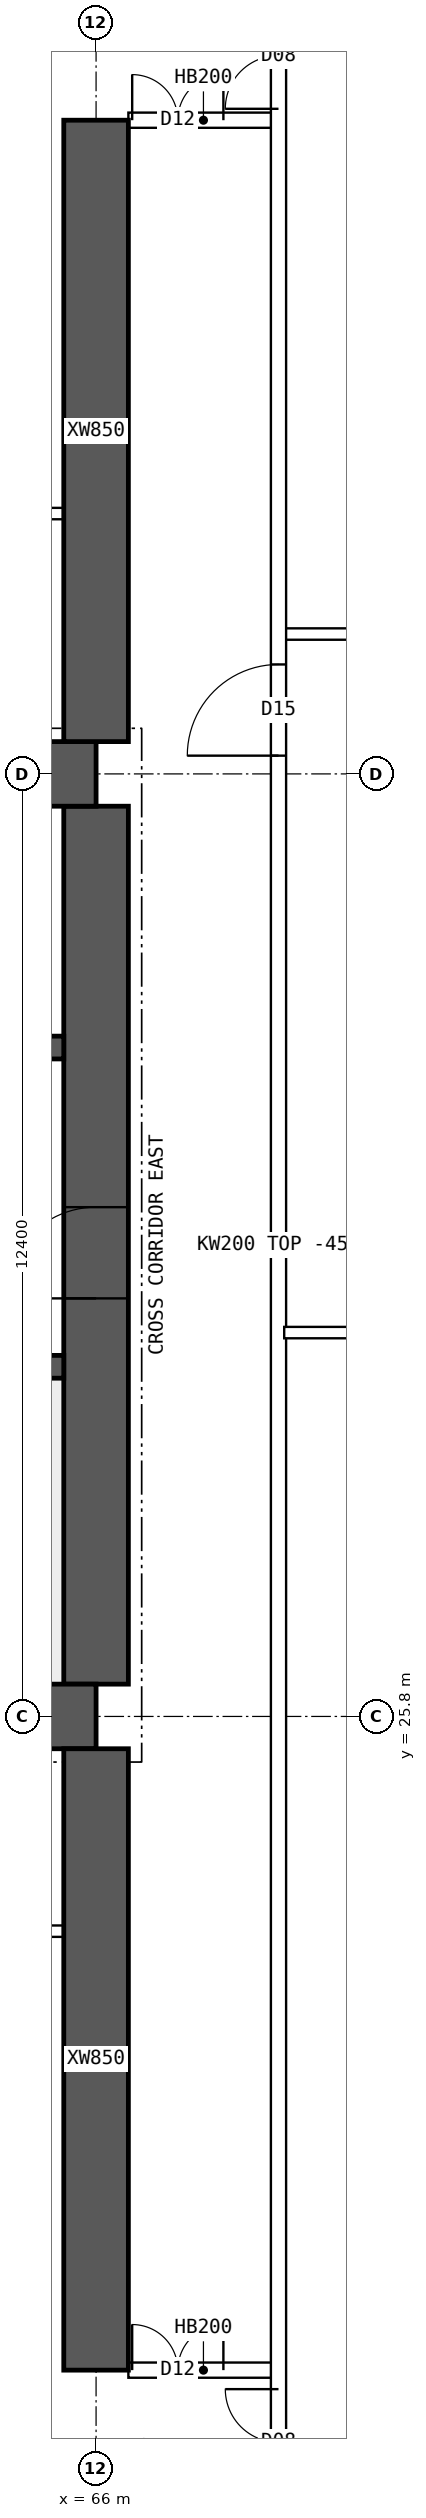
"""IFC4 building model, lengths in metres.
Left out: names, types, materials, properties, quantities, classifications, styles, units other than length and angle.
Written with IfcOpenShell. Run it as: python <this file> out.ifc"""

import sys

from ifc_helpers import new_model, si_unit, direction, frame, frame_2d, origin, place, context, subcontext, project, spatial, polyline, rectangle, outline, extrude, element, fill, save


model = new_model("IFC4")
c1 = context("Model", 3, precision=1e-05, world=origin(), true_north=direction((0.0, 1.0)))
c2 = subcontext(c1, "Body", "Model", "MODEL_VIEW")
j1 = project(units=[si_unit("LENGTHUNIT", "METRE"), si_unit("PLANEANGLEUNIT", "RADIAN")], contexts=[c1])
p1 = place(None, origin())
s1 = spatial("IfcSite", under=j1, at=p1, CompositionType="ELEMENT")
p2 = place(p1, origin())
s2 = spatial("IfcBuilding", under=s1, at=p2, CompositionType="ELEMENT")
p3 = place(p2, frame((0.0, 0.0, 189.85)))
s3 = spatial("IfcBuildingStorey", under=s2, at=p3, CompositionType="ELEMENT", Elevation=189.85)
for number, where, z_axis, x_axis in (
    (1, (18.0, 25.8, 0.0), (0.0, 0.0, 1.0), (1.0, 0.0, 0.0)),
    (2, (18.0, 38.2, 0.0), (0.0, 0.0, 1.0), (1.0, 0.0, 0.0)),
):
    element("IfcWall", number, at=place(p3, frame(where, z_axis=z_axis, x_axis=x_axis)), inside=s3, PredefinedType="SHEAR", context=c2, shape_type="SweptSolid", body=[
        extrude(rectangle(XDim=48.0, YDim=0.85, at=frame_2d((24.0, 0.0))), origin(), (0.0, 0.0, 1.0), 3.75),
    ])
p4 = place(p3, frame((66.0, 26.225, 0.0), z_axis=(0.0, 0.0, 1.0), x_axis=(0.0, 1.0, 0.0)))
e3 = element("IfcWall", 3, at=p4, inside=s3, PredefinedType="SHEAR", context=c2, shape_type="SweptSolid", body=[
    extrude(rectangle(XDim=11.55, YDim=0.85, at=frame_2d((5.775, 0.0))), origin(), (0.0, 0.0, 1.0), 3.75),
])
p5 = place(p4, frame((5.075, 0.0, 0.0)))
e4 = element("IfcOpeningElement", 4, at=p5, cuts=e3, PredefinedType="OPENING", context=c2, shape_type="SweptSolid", body=[
    extrude(rectangle(XDim=1.2, YDim=2.1, at=frame_2d((0.6, 1.05))), frame((0.0, 0.435, 0.0), z_axis=(0.0, -1.0, 0.0), x_axis=(1.0, 0.0, 0.0)), (0.0, 0.0, 1.0), 0.87),
])
p6 = place(p3, frame((18.425, 30.4, 0.0), z_axis=(0.0, 0.0, 1.0), x_axis=(1.0, 0.0, 0.0)))
e5 = element("IfcWall", 5, at=p6, inside=s3, PredefinedType="SHEAR", context=c2, shape_type="SweptSolid", body=[
    extrude(rectangle(XDim=47.15, YDim=0.3, at=frame_2d((23.575, 0.0))), origin(), (0.0, 0.0, 1.0), 3.75),
])
p7 = place(p6, frame((0.4, 0.0, 0.0)))
e6 = element("IfcOpeningElement", 6, at=p7, cuts=e5, PredefinedType="OPENING", context=c2, shape_type="SweptSolid", body=[
    extrude(rectangle(XDim=1.0, YDim=2.1, at=frame_2d((0.5, 1.05))), frame((0.0, 0.16, 0.0), z_axis=(0.0, -1.0, 0.0), x_axis=(1.0, 0.0, 0.0)), (0.0, 0.0, 1.0), 0.32),
])
p8 = place(p6, frame((45.75, 0.0, 0.0)))
e7 = element("IfcOpeningElement", 7, at=p8, cuts=e5, PredefinedType="OPENING", context=c2, shape_type="SweptSolid", body=[
    extrude(rectangle(XDim=1.0, YDim=2.1, at=frame_2d((0.5, 1.05))), frame((0.0, 0.16, 0.0), z_axis=(0.0, -1.0, 0.0), x_axis=(1.0, 0.0, 0.0)), (0.0, 0.0, 1.0), 0.32),
])
p9 = place(p6, frame((8.325, 0.0, 0.0)))
e8 = element("IfcOpeningElement", 8, at=p9, cuts=e5, PredefinedType="OPENING", context=c2, shape_type="SweptSolid", body=[
    extrude(rectangle(XDim=1.1, YDim=2.1, at=frame_2d((0.55, 1.05))), frame((0.0, 0.16, 0.0), z_axis=(0.0, -1.0, 0.0), x_axis=(1.0, 0.0, 0.0)), (0.0, 0.0, 1.0), 0.32),
])
p10 = place(p6, frame((10.925, 0.0, 0.0)))
e9 = element("IfcOpeningElement", 9, at=p10, cuts=e5, PredefinedType="OPENING", context=c2, shape_type="SweptSolid", body=[
    extrude(rectangle(XDim=1.1, YDim=2.1, at=frame_2d((0.55, 1.05))), frame((0.0, 0.16, 0.0), z_axis=(0.0, -1.0, 0.0), x_axis=(1.0, 0.0, 0.0)), (0.0, 0.0, 1.0), 0.32),
])
p11 = place(p6, frame((13.525, 0.0, 0.0)))
e10 = element("IfcOpeningElement", 10, at=p11, cuts=e5, PredefinedType="OPENING", context=c2, shape_type="SweptSolid", body=[
    extrude(rectangle(XDim=1.1, YDim=2.1, at=frame_2d((0.55, 1.05))), frame((0.0, 0.16, 0.0), z_axis=(0.0, -1.0, 0.0), x_axis=(1.0, 0.0, 0.0)), (0.0, 0.0, 1.0), 0.32),
])
p12 = place(p6, frame((16.125, 0.0, 0.0)))
e11 = element("IfcOpeningElement", 11, at=p12, cuts=e5, PredefinedType="OPENING", context=c2, shape_type="SweptSolid", body=[
    extrude(rectangle(XDim=1.1, YDim=2.1, at=frame_2d((0.55, 1.05))), frame((0.0, 0.16, 0.0), z_axis=(0.0, -1.0, 0.0), x_axis=(1.0, 0.0, 0.0)), (0.0, 0.0, 1.0), 0.32),
])
p13 = place(p6, frame((18.9, 0.0, 0.0)))
e12 = element("IfcOpeningElement", 12, at=p13, cuts=e5, PredefinedType="OPENING", context=c2, shape_type="SweptSolid", body=[
    extrude(rectangle(XDim=0.9, YDim=2.1, at=frame_2d((0.45, 1.05))), frame((0.0, 0.16, 0.0), z_axis=(0.0, -1.0, 0.0), x_axis=(1.0, 0.0, 0.0)), (0.0, 0.0, 1.0), 0.32),
])
p14 = place(p6, frame((30.192, 0.0, 0.0)))
e13 = element("IfcOpeningElement", 13, at=p14, cuts=e5, PredefinedType="OPENING", context=c2, shape_type="SweptSolid", body=[
    extrude(rectangle(XDim=1.1, YDim=2.1, at=frame_2d((0.55, 1.05))), frame((0.0, 0.16, 0.0), z_axis=(0.0, -1.0, 0.0), x_axis=(1.0, 0.0, 0.0)), (0.0, 0.0, 1.0), 0.32),
])
p15 = place(p6, frame((33.725, 0.0, 0.0)))
e14 = element("IfcOpeningElement", 14, at=p15, cuts=e5, PredefinedType="OPENING", context=c2, shape_type="SweptSolid", body=[
    extrude(rectangle(XDim=1.1, YDim=2.1, at=frame_2d((0.55, 1.05))), frame((0.0, 0.16, 0.0), z_axis=(0.0, -1.0, 0.0), x_axis=(1.0, 0.0, 0.0)), (0.0, 0.0, 1.0), 0.32),
])
p16 = place(p6, frame((37.258, 0.0, 0.0)))
e15 = element("IfcOpeningElement", 15, at=p16, cuts=e5, PredefinedType="OPENING", context=c2, shape_type="SweptSolid", body=[
    extrude(rectangle(XDim=1.1, YDim=2.1, at=frame_2d((0.55, 1.05))), frame((0.0, 0.16, 0.0), z_axis=(0.0, -1.0, 0.0), x_axis=(1.0, 0.0, 0.0)), (0.0, 0.0, 1.0), 0.32),
])
p17 = place(p3, frame((18.425, 34.6, 0.0), z_axis=(0.0, 0.0, 1.0), x_axis=(1.0, 0.0, 0.0)))
e16 = element("IfcWall", 16, at=p17, inside=s3, PredefinedType="SHEAR", context=c2, shape_type="SweptSolid", body=[
    extrude(rectangle(XDim=47.15, YDim=0.3, at=frame_2d((23.575, 0.0))), origin(), (0.0, 0.0, 1.0), 3.75),
])
p18 = place(p17, frame((0.9, 0.0, 0.0)))
e17 = element("IfcOpeningElement", 17, at=p18, cuts=e16, PredefinedType="OPENING", context=c2, shape_type="SweptSolid", body=[
    extrude(rectangle(XDim=1.1, YDim=2.1, at=frame_2d((0.55, 1.05))), frame((0.0, 0.16, 0.0), z_axis=(0.0, -1.0, 0.0), x_axis=(1.0, 0.0, 0.0)), (0.0, 0.0, 1.0), 0.32),
])
p19 = place(p17, frame((45.15, 0.0, 0.0)))
e18 = element("IfcOpeningElement", 18, at=p19, cuts=e16, PredefinedType="OPENING", context=c2, shape_type="SweptSolid", body=[
    extrude(rectangle(XDim=1.1, YDim=2.1, at=frame_2d((0.55, 1.05))), frame((0.0, 0.16, 0.0), z_axis=(0.0, -1.0, 0.0), x_axis=(1.0, 0.0, 0.0)), (0.0, 0.0, 1.0), 0.32),
])
p20 = place(p17, frame((4.175, 0.0, 0.0)))
e19 = element("IfcOpeningElement", 19, at=p20, cuts=e16, PredefinedType="OPENING", context=c2, shape_type="SweptSolid", body=[
    extrude(rectangle(XDim=0.9, YDim=2.1, at=frame_2d((0.45, 1.05))), frame((0.0, 0.16, 0.0), z_axis=(0.0, -1.0, 0.0), x_axis=(1.0, 0.0, 0.0)), (0.0, 0.0, 1.0), 0.32),
])
p21 = place(p17, frame((42.075, 0.0, 0.0)))
e20 = element("IfcOpeningElement", 20, at=p21, cuts=e16, PredefinedType="OPENING", context=c2, shape_type="SweptSolid", body=[
    extrude(rectangle(XDim=0.9, YDim=2.1, at=frame_2d((0.45, 1.05))), frame((0.0, 0.16, 0.0), z_axis=(0.0, -1.0, 0.0), x_axis=(1.0, 0.0, 0.0)), (0.0, 0.0, 1.0), 0.32),
])
p22 = place(p17, frame((8.95, 0.0, 0.0)))
e21 = element("IfcOpeningElement", 21, at=p22, cuts=e16, PredefinedType="OPENING", context=c2, shape_type="SweptSolid", body=[
    extrude(rectangle(XDim=0.9, YDim=2.1, at=frame_2d((0.45, 1.05))), frame((0.0, 0.16, 0.0), z_axis=(0.0, -1.0, 0.0), x_axis=(1.0, 0.0, 0.0)), (0.0, 0.0, 1.0), 0.32),
])
p23 = place(p17, frame((12.924, 0.0, 0.0)))
e22 = element("IfcOpeningElement", 22, at=p23, cuts=e16, PredefinedType="OPENING", context=c2, shape_type="SweptSolid", body=[
    extrude(rectangle(XDim=0.9, YDim=2.1, at=frame_2d((0.45, 1.05))), frame((0.0, 0.16, 0.0), z_axis=(0.0, -1.0, 0.0), x_axis=(1.0, 0.0, 0.0)), (0.0, 0.0, 1.0), 0.32),
])
p24 = place(p17, frame((16.571, 0.0, 0.0)))
e23 = element("IfcOpeningElement", 23, at=p24, cuts=e16, PredefinedType="OPENING", context=c2, shape_type="SweptSolid", body=[
    extrude(rectangle(XDim=0.9, YDim=2.1, at=frame_2d((0.45, 1.05))), frame((0.0, 0.16, 0.0), z_axis=(0.0, -1.0, 0.0), x_axis=(1.0, 0.0, 0.0)), (0.0, 0.0, 1.0), 0.32),
])
p25 = place(p17, frame((20.33, 0.0, 0.0)))
e24 = element("IfcOpeningElement", 24, at=p25, cuts=e16, PredefinedType="OPENING", context=c2, shape_type="SweptSolid", body=[
    extrude(rectangle(XDim=0.9, YDim=2.1, at=frame_2d((0.45, 1.05))), frame((0.0, 0.16, 0.0), z_axis=(0.0, -1.0, 0.0), x_axis=(1.0, 0.0, 0.0)), (0.0, 0.0, 1.0), 0.32),
])
p26 = place(p17, frame((24.736, 0.0, 0.0)))
e25 = element("IfcOpeningElement", 25, at=p26, cuts=e16, PredefinedType="OPENING", context=c2, shape_type="SweptSolid", body=[
    extrude(rectangle(XDim=0.9, YDim=2.1, at=frame_2d((0.45, 1.05))), frame((0.0, 0.16, 0.0), z_axis=(0.0, -1.0, 0.0), x_axis=(1.0, 0.0, 0.0)), (0.0, 0.0, 1.0), 0.32),
])
p27 = place(p17, frame((27.533, 0.0, 0.0)))
e26 = element("IfcOpeningElement", 26, at=p27, cuts=e16, PredefinedType="OPENING", context=c2, shape_type="SweptSolid", body=[
    extrude(rectangle(XDim=0.9, YDim=2.1, at=frame_2d((0.45, 1.05))), frame((0.0, 0.16, 0.0), z_axis=(0.0, -1.0, 0.0), x_axis=(1.0, 0.0, 0.0)), (0.0, 0.0, 1.0), 0.32),
])
p28 = place(p17, frame((30.716, 0.0, 0.0)))
e27 = element("IfcOpeningElement", 27, at=p28, cuts=e16, PredefinedType="OPENING", context=c2, shape_type="SweptSolid", body=[
    extrude(rectangle(XDim=0.9, YDim=2.1, at=frame_2d((0.45, 1.05))), frame((0.0, 0.16, 0.0), z_axis=(0.0, -1.0, 0.0), x_axis=(1.0, 0.0, 0.0)), (0.0, 0.0, 1.0), 0.32),
])
p29 = place(p17, frame((34.667, 0.0, 0.0)))
e28 = element("IfcOpeningElement", 28, at=p29, cuts=e16, PredefinedType="OPENING", context=c2, shape_type="SweptSolid", body=[
    extrude(rectangle(XDim=0.9, YDim=2.1, at=frame_2d((0.45, 1.05))), frame((0.0, 0.16, 0.0), z_axis=(0.0, -1.0, 0.0), x_axis=(1.0, 0.0, 0.0)), (0.0, 0.0, 1.0), 0.32),
])
p30 = place(p17, frame((37.605, 0.0, 0.0)))
e29 = element("IfcOpeningElement", 29, at=p30, cuts=e16, PredefinedType="OPENING", context=c2, shape_type="SweptSolid", body=[
    extrude(rectangle(XDim=0.9, YDim=2.1, at=frame_2d((0.45, 1.05))), frame((0.0, 0.16, 0.0), z_axis=(0.0, -1.0, 0.0), x_axis=(1.0, 0.0, 0.0)), (0.0, 0.0, 1.0), 0.32),
])
for number, where, z_axis, x_axis in (
    (30, (66.0, 17.2, 0.0), (0.0, 0.0, 1.0), (0.0, 1.0, 0.0)),
    (31, (66.0, 38.625, 0.0), (0.0, 0.0, 1.0), (0.0, 1.0, 0.0)),
):
    element("IfcWall", number, at=place(p3, frame(where, z_axis=z_axis, x_axis=x_axis)), inside=s3, PredefinedType="SHEAR", context=c2, shape_type="SweptSolid", body=[
        extrude(rectangle(XDim=8.175, YDim=0.85, at=frame_2d((4.087, 0.0))), origin(), (0.0, 0.0, 1.0), 3.75),
    ])
p31 = place(p3, frame((66.425, 17.2, 0.0), z_axis=(0.0, 0.0, 1.0), x_axis=(1.0, 0.0, 0.0)))
e32 = element("IfcWall", 32, at=p31, inside=s3, PredefinedType="SOLIDWALL", context=c2, shape_type="SweptSolid", body=[
    extrude(rectangle(XDim=1.975, YDim=0.2, at=frame_2d((0.987, 0.0))), origin(), (0.0, 0.0, 1.0), 3.3),
])
p32 = place(p31, frame((0.05, 0.0, 0.0)))
e33 = element("IfcOpeningElement", 33, at=p32, cuts=e32, PredefinedType="OPENING", context=c2, shape_type="SweptSolid", body=[
    extrude(rectangle(XDim=1.2, YDim=2.1, at=frame_2d((0.6, 1.05))), frame((0.0, 0.11, 0.0), z_axis=(0.0, -1.0, 0.0), x_axis=(1.0, 0.0, 0.0)), (0.0, 0.0, 1.0), 0.22),
])
p33 = place(p3, frame((66.425, 46.8, 0.0), z_axis=(0.0, 0.0, 1.0), x_axis=(1.0, 0.0, 0.0)))
e34 = element("IfcWall", 34, at=p33, inside=s3, PredefinedType="SOLIDWALL", context=c2, shape_type="SweptSolid", body=[
    extrude(rectangle(XDim=1.975, YDim=0.2, at=frame_2d((0.987, 0.0))), origin(), (0.0, 0.0, 1.0), 3.3),
])
p34 = place(p33, frame((0.05, 0.0, 0.0)))
e35 = element("IfcOpeningElement", 35, at=p34, cuts=e34, PredefinedType="OPENING", context=c2, shape_type="SweptSolid", body=[
    extrude(rectangle(XDim=1.2, YDim=2.1, at=frame_2d((0.6, 1.05))), frame((0.0, 0.11, 0.0), z_axis=(0.0, -1.0, 0.0), x_axis=(1.0, 0.0, 0.0)), (0.0, 0.0, 1.0), 0.22),
])
p35 = place(p3, frame((60.075, 22.975, 0.0), z_axis=(0.0, 0.0, 1.0), x_axis=(1.0, 0.0, 0.0)))
e36 = element("IfcWall", 36, at=p35, inside=s3, PredefinedType="PARTITIONING", context=c2, shape_type="SweptSolid", body=[
    extrude(rectangle(XDim=5.5, YDim=0.15, at=frame_2d((2.75, 0.0))), origin(), (0.0, 0.0, 1.0), 3.3),
])
p36 = place(p35, frame((0.4, 0.0, 0.0)))
e37 = element("IfcOpeningElement", 37, at=p36, cuts=e36, PredefinedType="OPENING", context=c2, shape_type="SweptSolid", body=[
    extrude(rectangle(XDim=1.0, YDim=2.1, at=frame_2d((0.5, 1.05))), frame((0.0, 0.085, 0.0), z_axis=(0.0, -1.0, 0.0), x_axis=(1.0, 0.0, 0.0)), (0.0, 0.0, 1.0), 0.17),
])
p37 = place(p3, frame((65.575, 41.625, 0.0), z_axis=(0.0, 0.0, 1.0), x_axis=(-1.0, 0.0, 0.0)))
e38 = element("IfcWall", 38, at=p37, inside=s3, PredefinedType="PARTITIONING", context=c2, shape_type="SweptSolid", body=[
    extrude(rectangle(XDim=5.5, YDim=0.15, at=frame_2d((2.75, 0.0))), origin(), (0.0, 0.0, 1.0), 3.3),
])
p38 = place(p37, frame((0.4, 0.0, 0.0)))
e39 = element("IfcOpeningElement", 39, at=p38, cuts=e38, PredefinedType="OPENING", context=c2, shape_type="SweptSolid", body=[
    extrude(rectangle(XDim=1.0, YDim=2.1, at=frame_2d((0.5, 1.05))), frame((0.0, 0.085, 0.0), z_axis=(0.0, -1.0, 0.0), x_axis=(1.0, 0.0, 0.0)), (0.0, 0.0, 1.0), 0.17),
])
p39 = place(p3, frame((68.475, 30.85, 0.0), z_axis=(0.0, 0.0, 1.0), x_axis=(1.0, 0.0, 0.0)))
e40 = element("IfcWall", 40, at=p39, inside=s3, PredefinedType="PARTITIONING", context=c2, shape_type="SweptSolid", body=[
    extrude(outline(polyline([(0.0, 0.0), (6.82, 0.0), (6.82, 3.3), (3.827, 3.3), (3.825, 2.85), (3.227, 2.85), (3.225, 3.3), (0.0, 3.3), (0.0, 0.0)])), frame((0.0, 0.075, 0.0), z_axis=(0.0, -1.0, 0.0), x_axis=(1.0, 0.0, 0.0)), (0.0, 0.0, 1.0), 0.15),
])
p40 = place(p3, frame((68.4, 10.446, 0.0), z_axis=(0.0, 0.0, 1.0), x_axis=(0.0, 1.0, 0.0)))
e41 = element("IfcWall", 41, at=p40, inside=s3, PredefinedType="SOLIDWALL", context=c2, shape_type="SweptSolid", body=[
    extrude(rectangle(XDim=43.107, YDim=0.2, at=frame_2d((21.554, 0.0))), origin(), (0.0, 0.0, 1.0), 3.3),
])
p41 = place(p40, frame((27.994, 0.0, 0.0)))
e42 = element("IfcOpeningElement", 42, at=p41, cuts=e41, PredefinedType="OPENING", context=c2, shape_type="SweptSolid", body=[
    extrude(rectangle(XDim=1.2, YDim=2.1, at=frame_2d((0.6, 1.05))), frame((0.0, 0.11, 0.0), z_axis=(0.0, -1.0, 0.0), x_axis=(1.0, 0.0, 0.0)), (0.0, 0.0, 1.0), 0.22),
])
p42 = place(p40, frame((5.104, 0.0, 0.0)))
e43 = element("IfcOpeningElement", 43, at=p42, cuts=e41, PredefinedType="OPENING", context=c2, shape_type="SweptSolid", body=[
    extrude(rectangle(XDim=1.4, YDim=2.1, at=frame_2d((0.7, 1.05))), frame((0.0, 0.11, 0.0), z_axis=(0.0, -1.0, 0.0), x_axis=(1.0, 0.0, 0.0)), (0.0, 0.0, 1.0), 0.22),
])
p43 = place(p40, frame((36.504, 0.0, 0.0)))
e44 = element("IfcOpeningElement", 44, at=p43, cuts=e41, PredefinedType="OPENING", context=c2, shape_type="SweptSolid", body=[
    extrude(rectangle(XDim=1.4, YDim=2.1, at=frame_2d((0.7, 1.05))), frame((0.0, 0.11, 0.0), z_axis=(0.0, -1.0, 0.0), x_axis=(1.0, 0.0, 0.0)), (0.0, 0.0, 1.0), 0.22),
])
p44 = place(p3, frame((68.475, 40.04, 0.0), z_axis=(0.0, 0.0, 1.0), x_axis=(1.0, 0.0, 0.0)))
e45 = element("IfcWall", 45, at=p44, inside=s3, PredefinedType="PARTITIONING", context=c2, shape_type="SweptSolid", body=[
    extrude(rectangle(XDim=6.82, YDim=0.15, at=frame_2d((3.41, 0.0))), origin(), (0.0, 0.0, 1.0), 3.3),
])
p45 = place(p5, origin())
e46 = element("IfcDoor", 46, at=p45, inside=s3, OperationType="SINGLE_SWING_LEFT", PredefinedType="DOOR", context=c2, shape_type="SweptSolid", body=[
    extrude(rectangle(XDim=1.2, YDim=2.1, at=frame_2d((0.6, 1.05))), frame((0.0, 0.025, 0.0), z_axis=(0.0, -1.0, 0.0), x_axis=(1.0, 0.0, 0.0)), (0.0, 0.0, 1.0), 0.05),
])
fill(e4, e46)
p46 = place(p32, origin())
e47 = element("IfcDoor", 47, at=p46, inside=s3, OperationType="DOUBLE_DOOR_SINGLE_SWING", PredefinedType="DOOR", context=c2, shape_type="SweptSolid", body=[
    extrude(rectangle(XDim=1.2, YDim=2.1, at=frame_2d((0.6, 1.05))), frame((0.0, 0.025, 0.0), z_axis=(0.0, -1.0, 0.0), x_axis=(1.0, 0.0, 0.0)), (0.0, 0.0, 1.0), 0.05),
])
fill(e33, e47)
p47 = place(p34, origin())
e48 = element("IfcDoor", 48, at=p47, inside=s3, OperationType="DOUBLE_DOOR_SINGLE_SWING", PredefinedType="DOOR", context=c2, shape_type="SweptSolid", body=[
    extrude(rectangle(XDim=1.2, YDim=2.1, at=frame_2d((0.6, 1.05))), frame((0.0, 0.025, 0.0), z_axis=(0.0, -1.0, 0.0), x_axis=(1.0, 0.0, 0.0)), (0.0, 0.0, 1.0), 0.05),
])
fill(e35, e48)
p48 = place(p41, origin())
e49 = element("IfcDoor", 49, at=p48, inside=s3, OperationType="SINGLE_SWING_LEFT", PredefinedType="DOOR", context=c2, shape_type="SweptSolid", body=[
    extrude(rectangle(XDim=1.2, YDim=2.1, at=frame_2d((0.6, 1.05))), frame((0.0, 0.025, 0.0), z_axis=(0.0, -1.0, 0.0), x_axis=(1.0, 0.0, 0.0)), (0.0, 0.0, 1.0), 0.05),
])
fill(e42, e49)
p49 = place(p42, origin())
e50 = element("IfcDoor", 50, at=p49, inside=s3, OperationType="DOUBLE_DOOR_SINGLE_SWING", PredefinedType="DOOR", context=c2, shape_type="SweptSolid", body=[
    extrude(rectangle(XDim=1.4, YDim=2.1, at=frame_2d((0.7, 1.05))), frame((0.0, 0.025, 0.0), z_axis=(0.0, -1.0, 0.0), x_axis=(1.0, 0.0, 0.0)), (0.0, 0.0, 1.0), 0.05),
])
fill(e43, e50)
p50 = place(p43, origin())
e51 = element("IfcDoor", 51, at=p50, inside=s3, OperationType="DOUBLE_DOOR_SINGLE_SWING", PredefinedType="DOOR", context=c2, shape_type="SweptSolid", body=[
    extrude(rectangle(XDim=1.4, YDim=2.1, at=frame_2d((0.7, 1.05))), frame((0.0, 0.025, 0.0), z_axis=(0.0, -1.0, 0.0), x_axis=(1.0, 0.0, 0.0)), (0.0, 0.0, 1.0), 0.05),
])
fill(e44, e51)
save(model, sys.argv[1])
